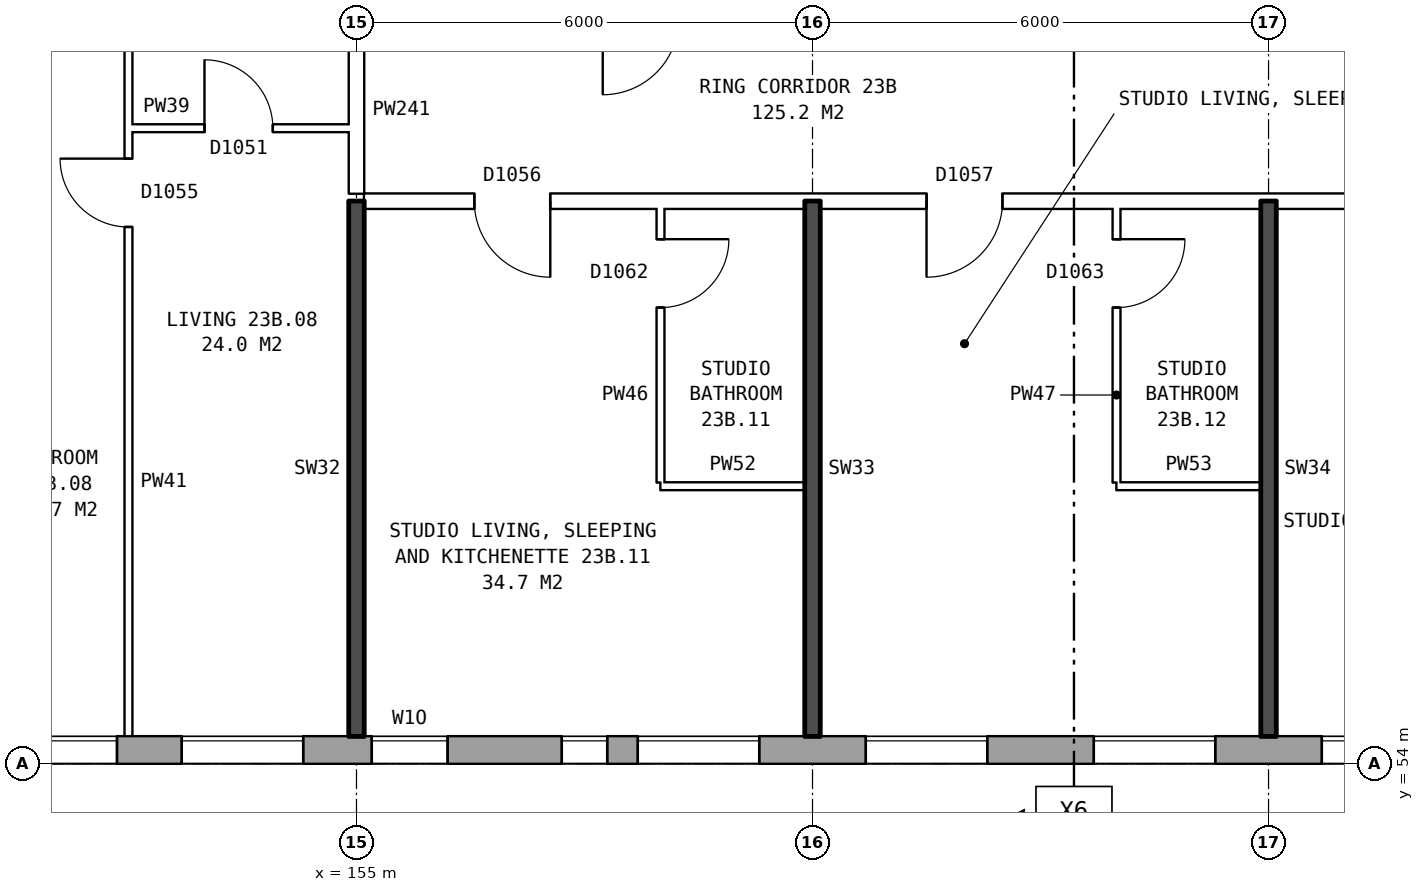
"""IFC4 building model, lengths in metres.
Left out: names, types, materials, properties, quantities, classifications, styles, units other than length and angle.
Written with IfcOpenShell. Run it as: python <this file> out.ifc"""

import sys

from ifc_helpers import new_model, si_unit, direction, frame, frame_2d, origin, place, context, subcontext, project, spatial, rectangle, extrude, element, fill, save


model = new_model("IFC4")
c1 = context("Model", 3, precision=1e-05, world=origin(), true_north=direction((0.0, 1.0)))
c2 = subcontext(c1, "Body", "Model", "MODEL_VIEW")
j1 = project(units=[si_unit("LENGTHUNIT", "METRE"), si_unit("PLANEANGLEUNIT", "RADIAN")], contexts=[c1])
p1 = place(None, origin())
s1 = spatial("IfcSite", under=j1, at=p1, CompositionType="ELEMENT")
p2 = place(p1, origin())
s2 = spatial("IfcBuilding", under=s1, at=p2, CompositionType="ELEMENT")
p3 = place(p2, frame((0.0, 0.0, 84.0)))
s3 = spatial("IfcBuildingStorey", under=s2, at=p3, CompositionType="ELEMENT", Elevation=84.0)
p4 = place(p3, frame((134.075, 54.18, 0.0), z_axis=(0.0, 0.0, 1.0), x_axis=(1.0, 0.0, 0.0)))
e1 = element("IfcWall", 1, at=p4, inside=s3, PredefinedType="STANDARD", context=c2, shape_type="SweptSolid", body=[
    extrude(rectangle(XDim=38.101, YDim=0.36, at=frame_2d((19.05, 0.0))), origin(), (0.0, 0.0, 1.0), 2.85),
])
p5 = place(p4, frame((0.625, 0.0, 0.8)))
e2 = element("IfcOpeningElement", 2, at=p5, cuts=e1, PredefinedType="OPENING", context=c2, shape_type="SweptSolid", body=[
    extrude(rectangle(XDim=1.6, YDim=1.8, at=frame_2d((0.8, 0.9))), frame((0.0, 0.19, 0.0), z_axis=(0.0, -1.0, 0.0), x_axis=(1.0, 0.0, 0.0)), (0.0, 0.0, 1.0), 0.38),
])
p6 = place(p4, frame((3.625, 0.0, 0.8)))
e3 = element("IfcOpeningElement", 3, at=p6, cuts=e1, PredefinedType="OPENING", context=c2, shape_type="SweptSolid", body=[
    extrude(rectangle(XDim=1.6, YDim=1.8, at=frame_2d((0.8, 0.9))), frame((0.0, 0.19, 0.0), z_axis=(0.0, -1.0, 0.0), x_axis=(1.0, 0.0, 0.0)), (0.0, 0.0, 1.0), 0.38),
])
p7 = place(p4, frame((6.625, 0.0, 0.8)))
e4 = element("IfcOpeningElement", 4, at=p7, cuts=e1, PredefinedType="OPENING", context=c2, shape_type="SweptSolid", body=[
    extrude(rectangle(XDim=1.6, YDim=1.8, at=frame_2d((0.8, 0.9))), frame((0.0, 0.19, 0.0), z_axis=(0.0, -1.0, 0.0), x_axis=(1.0, 0.0, 0.0)), (0.0, 0.0, 1.0), 0.38),
])
p8 = place(p4, frame((9.625, 0.0, 0.8)))
e5 = element("IfcOpeningElement", 5, at=p8, cuts=e1, PredefinedType="OPENING", context=c2, shape_type="SweptSolid", body=[
    extrude(rectangle(XDim=1.6, YDim=1.8, at=frame_2d((0.8, 0.9))), frame((0.0, 0.19, 0.0), z_axis=(0.0, -1.0, 0.0), x_axis=(1.0, 0.0, 0.0)), (0.0, 0.0, 1.0), 0.38),
])
p9 = place(p4, frame((12.075, 0.0, 0.8)))
e6 = element("IfcOpeningElement", 6, at=p9, cuts=e1, PredefinedType="OPENING", context=c2, shape_type="SweptSolid", body=[
    extrude(rectangle(XDim=1.4, YDim=1.8, at=frame_2d((0.7, 0.9))), frame((0.0, 0.19, 0.0), z_axis=(0.0, -1.0, 0.0), x_axis=(1.0, 0.0, 0.0)), (0.0, 0.0, 1.0), 0.38),
])
p10 = place(p4, frame((15.475, 0.0, 0.65)))
e7 = element("IfcOpeningElement", 7, at=p10, cuts=e1, PredefinedType="OPENING", context=c2, shape_type="SweptSolid", body=[
    extrude(rectangle(XDim=0.6, YDim=0.9, at=frame_2d((0.3, 0.45))), frame((0.0, 0.19, 0.0), z_axis=(0.0, -1.0, 0.0), x_axis=(1.0, 0.0, 0.0)), (0.0, 0.0, 1.0), 0.38),
])
p11 = place(p4, frame((18.625, 0.0, 0.8)))
e8 = element("IfcOpeningElement", 8, at=p11, cuts=e1, PredefinedType="OPENING", context=c2, shape_type="SweptSolid", body=[
    extrude(rectangle(XDim=1.6, YDim=1.8, at=frame_2d((0.8, 0.9))), frame((0.0, 0.19, 0.0), z_axis=(0.0, -1.0, 0.0), x_axis=(1.0, 0.0, 0.0)), (0.0, 0.0, 1.0), 0.38),
])
p12 = place(p4, frame((21.125, 0.0, 0.8)))
e9 = element("IfcOpeningElement", 9, at=p12, cuts=e1, PredefinedType="OPENING", context=c2, shape_type="SweptSolid", body=[
    extrude(rectangle(XDim=1.0, YDim=1.2, at=frame_2d((0.5, 0.6))), frame((0.0, 0.19, 0.0), z_axis=(0.0, -1.0, 0.0), x_axis=(1.0, 0.0, 0.0)), (0.0, 0.0, 1.0), 0.38),
])
p13 = place(p4, frame((24.625, 0.0, 0.8)))
e10 = element("IfcOpeningElement", 10, at=p13, cuts=e1, PredefinedType="OPENING", context=c2, shape_type="SweptSolid", body=[
    extrude(rectangle(XDim=1.6, YDim=1.8, at=frame_2d((0.8, 0.9))), frame((0.0, 0.19, 0.0), z_axis=(0.0, -1.0, 0.0), x_axis=(1.0, 0.0, 0.0)), (0.0, 0.0, 1.0), 0.38),
])
p14 = place(p4, frame((27.625, 0.0, 0.8)))
e11 = element("IfcOpeningElement", 11, at=p14, cuts=e1, PredefinedType="OPENING", context=c2, shape_type="SweptSolid", body=[
    extrude(rectangle(XDim=1.6, YDim=1.8, at=frame_2d((0.8, 0.9))), frame((0.0, 0.19, 0.0), z_axis=(0.0, -1.0, 0.0), x_axis=(1.0, 0.0, 0.0)), (0.0, 0.0, 1.0), 0.38),
])
p15 = place(p4, frame((30.625, 0.0, 0.8)))
e12 = element("IfcOpeningElement", 12, at=p15, cuts=e1, PredefinedType="OPENING", context=c2, shape_type="SweptSolid", body=[
    extrude(rectangle(XDim=1.6, YDim=1.8, at=frame_2d((0.8, 0.9))), frame((0.0, 0.19, 0.0), z_axis=(0.0, -1.0, 0.0), x_axis=(1.0, 0.0, 0.0)), (0.0, 0.0, 1.0), 0.38),
])
p16 = place(p4, frame((33.625, 0.0, 0.8)))
e13 = element("IfcOpeningElement", 13, at=p16, cuts=e1, PredefinedType="OPENING", context=c2, shape_type="SweptSolid", body=[
    extrude(rectangle(XDim=1.6, YDim=1.8, at=frame_2d((0.8, 0.9))), frame((0.0, 0.19, 0.0), z_axis=(0.0, -1.0, 0.0), x_axis=(1.0, 0.0, 0.0)), (0.0, 0.0, 1.0), 0.38),
])
p17 = place(p4, frame((13.775, 0.0, 1.6)))
e14 = element("IfcOpeningElement", 14, at=p17, cuts=e1, PredefinedType="OPENING", context=c2, shape_type="SweptSolid", body=[
    extrude(rectangle(XDim=0.6, YDim=0.9, at=frame_2d((0.3, 0.45))), frame((0.0, 0.19, 0.0), z_axis=(0.0, -1.0, 0.0), x_axis=(1.0, 0.0, 0.0)), (0.0, 0.0, 1.0), 0.38),
])
p18 = place(p4, frame((16.375, 0.0, 0.65)))
e15 = element("IfcOpeningElement", 15, at=p18, cuts=e1, PredefinedType="OPENING", context=c2, shape_type="SweptSolid", body=[
    extrude(rectangle(XDim=1.4, YDim=1.8, at=frame_2d((0.7, 0.9))), frame((0.0, 0.19, 0.0), z_axis=(0.0, -1.0, 0.0), x_axis=(1.0, 0.0, 0.0)), (0.0, 0.0, 1.0), 0.38),
])
p19 = place(p4, frame((23.625, 0.0, 1.7)))
e16 = element("IfcOpeningElement", 16, at=p19, cuts=e1, PredefinedType="OPENING", context=c2, shape_type="SweptSolid", body=[
    extrude(rectangle(XDim=0.6, YDim=0.9, at=frame_2d((0.3, 0.45))), frame((0.0, 0.19, 0.0), z_axis=(0.0, -1.0, 0.0), x_axis=(1.0, 0.0, 0.0)), (0.0, 0.0, 1.0), 0.38),
])
for number, where, z_axis, x_axis in (
    (17, (159.0, 57.65, 0.0), (0.0, 0.0, 1.0), (1.0, 0.0, 0.0)),
    (18, (165.0, 57.65, 0.0), (0.0, 0.0, 1.0), (1.0, 0.0, 0.0)),
):
    element("IfcWall", number, at=place(p3, frame(where, z_axis=z_axis, x_axis=x_axis)), inside=s3, PredefinedType="PARTITIONING", context=c2, shape_type="SweptSolid", body=[
        extrude(rectangle(XDim=1.9, YDim=0.1, at=frame_2d((0.95, 0.0))), origin(), (0.0, 0.0, 1.0), 2.85),
    ])
p20 = place(p3, frame((155.1, 61.4, 0.0), z_axis=(0.0, 0.0, 1.0), x_axis=(1.0, 0.0, 0.0)))
e19 = element("IfcWall", 19, at=p20, inside=s3, PredefinedType="PARTITIONING", context=c2, shape_type="SweptSolid", body=[
    extrude(rectangle(XDim=19.79, YDim=0.2, at=frame_2d((9.895, 0.0))), origin(), (0.0, 0.0, 1.0), 2.85),
])
p21 = place(p20, frame((1.45, 0.0, 0.0)))
e20 = element("IfcOpeningElement", 20, at=p21, cuts=e19, PredefinedType="OPENING", context=c2, shape_type="SweptSolid", body=[
    extrude(rectangle(XDim=1.0, YDim=2.1, at=frame_2d((0.5, 1.05))), frame((0.0, 0.11, 0.0), z_axis=(0.0, -1.0, 0.0), x_axis=(1.0, 0.0, 0.0)), (0.0, 0.0, 1.0), 0.22),
])
p22 = place(p20, frame((7.4, 0.0, 0.0)))
e21 = element("IfcOpeningElement", 21, at=p22, cuts=e19, PredefinedType="OPENING", context=c2, shape_type="SweptSolid", body=[
    extrude(rectangle(XDim=1.0, YDim=2.1, at=frame_2d((0.5, 1.05))), frame((0.0, 0.11, 0.0), z_axis=(0.0, -1.0, 0.0), x_axis=(1.0, 0.0, 0.0)), (0.0, 0.0, 1.0), 0.22),
])
p23 = place(p20, frame((13.2, 0.0, 0.0)))
e22 = element("IfcOpeningElement", 22, at=p23, cuts=e19, PredefinedType="OPENING", context=c2, shape_type="SweptSolid", body=[
    extrude(rectangle(XDim=1.0, YDim=2.1, at=frame_2d((0.5, 1.05))), frame((0.0, 0.11, 0.0), z_axis=(0.0, -1.0, 0.0), x_axis=(1.0, 0.0, 0.0)), (0.0, 0.0, 1.0), 0.22),
])
p24 = place(p3, frame((152.0, 62.36, 0.0), z_axis=(0.0, 0.0, 1.0), x_axis=(1.0, 0.0, 0.0)))
e23 = element("IfcWall", 23, at=p24, inside=s3, PredefinedType="PARTITIONING", context=c2, shape_type="SweptSolid", body=[
    extrude(rectangle(XDim=2.9, YDim=0.1, at=frame_2d((1.45, 0.0))), origin(), (0.0, 0.0, 1.0), 2.85),
])
p25 = place(p24, frame((1.0, 0.0, 0.0)))
e24 = element("IfcOpeningElement", 24, at=p25, cuts=e23, PredefinedType="OPENING", context=c2, shape_type="SweptSolid", body=[
    extrude(rectangle(XDim=0.9, YDim=2.1, at=frame_2d((0.45, 1.05))), frame((0.0, 0.06, 0.0), z_axis=(0.0, -1.0, 0.0), x_axis=(1.0, 0.0, 0.0)), (0.0, 0.0, 1.0), 0.12),
])
p26 = place(p3, frame((152.0, 54.36, 0.0), z_axis=(0.0, 0.0, 1.0), x_axis=(0.0, 1.0, 0.0)))
e25 = element("IfcWall", 25, at=p26, inside=s3, PredefinedType="PARTITIONING", context=c2, shape_type="SweptSolid", body=[
    extrude(rectangle(XDim=14.34, YDim=0.1, at=frame_2d((7.17, 0.0))), origin(), (0.0, 0.0, 1.0), 2.85),
])
p27 = place(p26, frame((6.7, 0.0, 0.0)))
e26 = element("IfcOpeningElement", 26, at=p27, cuts=e25, PredefinedType="OPENING", context=c2, shape_type="SweptSolid", body=[
    extrude(rectangle(XDim=0.9, YDim=2.1, at=frame_2d((0.45, 1.05))), frame((0.0, 0.06, 0.0), z_axis=(0.0, -1.0, 0.0), x_axis=(1.0, 0.0, 0.0)), (0.0, 0.0, 1.0), 0.12),
])
p28 = place(p26, frame((13.04, 0.0, 0.0)))
e27 = element("IfcOpeningElement", 27, at=p28, cuts=e25, PredefinedType="OPENING", context=c2, shape_type="SweptSolid", body=[
    extrude(rectangle(XDim=0.9, YDim=2.1, at=frame_2d((0.45, 1.05))), frame((0.0, 0.06, 0.0), z_axis=(0.0, -1.0, 0.0), x_axis=(1.0, 0.0, 0.0)), (0.0, 0.0, 1.0), 0.12),
])
p29 = place(p3, frame((155.0, 54.36, 0.0), z_axis=(0.0, 0.0, 1.0), x_axis=(0.0, 1.0, 0.0)))
e28 = element("IfcWall", 28, at=p29, inside=s3, PredefinedType="SOLIDWALL", context=c2, shape_type="SweptSolid", body=[
    extrude(rectangle(XDim=7.04, YDim=0.2, at=frame_2d((3.52, 0.0))), origin(), (0.0, 0.0, 1.0), 2.85),
])
p30 = place(p3, frame((155.0, 61.5, 0.0), z_axis=(0.0, 0.0, 1.0), x_axis=(0.0, 1.0, 0.0)))
e29 = element("IfcWall", 29, at=p30, inside=s3, PredefinedType="PARTITIONING", context=c2, shape_type="SweptSolid", body=[
    extrude(rectangle(XDim=2.2, YDim=0.2, at=frame_2d((1.1, 0.0))), origin(), (0.0, 0.0, 1.0), 2.85),
])
p31 = place(p3, frame((159.0, 57.7, 0.0), z_axis=(0.0, 0.0, 1.0), x_axis=(0.0, 1.0, 0.0)))
e30 = element("IfcWall", 30, at=p31, inside=s3, PredefinedType="PARTITIONING", context=c2, shape_type="SweptSolid", body=[
    extrude(rectangle(XDim=3.6, YDim=0.1, at=frame_2d((1.8, 0.0))), origin(), (0.0, 0.0, 1.0), 2.85),
])
p32 = place(p31, frame((2.3, 0.0, 0.0)))
e31 = element("IfcOpeningElement", 31, at=p32, cuts=e30, PredefinedType="OPENING", context=c2, shape_type="SweptSolid", body=[
    extrude(rectangle(XDim=0.9, YDim=2.1, at=frame_2d((0.45, 1.05))), frame((0.0, 0.06, 0.0), z_axis=(0.0, -1.0, 0.0), x_axis=(1.0, 0.0, 0.0)), (0.0, 0.0, 1.0), 0.12),
])
p33 = place(p3, frame((161.0, 54.36, 0.0), z_axis=(0.0, 0.0, 1.0), x_axis=(0.0, 1.0, 0.0)))
e32 = element("IfcWall", 32, at=p33, inside=s3, PredefinedType="SOLIDWALL", context=c2, shape_type="SweptSolid", body=[
    extrude(rectangle(XDim=7.04, YDim=0.2, at=frame_2d((3.52, 0.0))), origin(), (0.0, 0.0, 1.0), 2.85),
])
p34 = place(p3, frame((165.0, 57.7, 0.0), z_axis=(0.0, 0.0, 1.0), x_axis=(0.0, 1.0, 0.0)))
e33 = element("IfcWall", 33, at=p34, inside=s3, PredefinedType="PARTITIONING", context=c2, shape_type="SweptSolid", body=[
    extrude(rectangle(XDim=3.6, YDim=0.1, at=frame_2d((1.8, 0.0))), origin(), (0.0, 0.0, 1.0), 2.85),
])
p35 = place(p34, frame((2.3, 0.0, 0.0)))
e34 = element("IfcOpeningElement", 34, at=p35, cuts=e33, PredefinedType="OPENING", context=c2, shape_type="SweptSolid", body=[
    extrude(rectangle(XDim=0.9, YDim=2.1, at=frame_2d((0.45, 1.05))), frame((0.0, 0.06, 0.0), z_axis=(0.0, -1.0, 0.0), x_axis=(1.0, 0.0, 0.0)), (0.0, 0.0, 1.0), 0.12),
])
p36 = place(p3, frame((167.0, 54.36, 0.0), z_axis=(0.0, 0.0, 1.0), x_axis=(0.0, 1.0, 0.0)))
e35 = element("IfcWall", 35, at=p36, inside=s3, PredefinedType="SOLIDWALL", context=c2, shape_type="SweptSolid", body=[
    extrude(rectangle(XDim=7.04, YDim=0.2, at=frame_2d((3.52, 0.0))), origin(), (0.0, 0.0, 1.0), 2.85),
])
p37 = place(p11, origin())
e36 = element("IfcWindow", 36, at=p37, inside=s3, PartitioningType="SINGLE_PANEL", PredefinedType="WINDOW", context=c2, shape_type="SweptSolid", body=[
    extrude(rectangle(XDim=1.6, YDim=1.8, at=frame_2d((0.8, 0.9))), frame((0.0, 0.15, 0.0), z_axis=(0.0, -1.0, 0.0), x_axis=(1.0, 0.0, 0.0)), (0.0, 0.0, 1.0), 0.06),
])
fill(e8, e36)
p38 = place(p12, origin())
e37 = element("IfcWindow", 37, at=p38, inside=s3, PartitioningType="SINGLE_PANEL", PredefinedType="WINDOW", context=c2, shape_type="SweptSolid", body=[
    extrude(rectangle(XDim=1.0, YDim=1.2, at=frame_2d((0.5, 0.6))), frame((0.0, 0.15, 0.0), z_axis=(0.0, -1.0, 0.0), x_axis=(1.0, 0.0, 0.0)), (0.0, 0.0, 1.0), 0.06),
])
fill(e9, e37)
p39 = place(p13, origin())
e38 = element("IfcWindow", 38, at=p39, inside=s3, PartitioningType="SINGLE_PANEL", PredefinedType="WINDOW", context=c2, shape_type="SweptSolid", body=[
    extrude(rectangle(XDim=1.6, YDim=1.8, at=frame_2d((0.8, 0.9))), frame((0.0, 0.15, 0.0), z_axis=(0.0, -1.0, 0.0), x_axis=(1.0, 0.0, 0.0)), (0.0, 0.0, 1.0), 0.06),
])
fill(e10, e38)
p40 = place(p14, origin())
e39 = element("IfcWindow", 39, at=p40, inside=s3, PartitioningType="SINGLE_PANEL", PredefinedType="WINDOW", context=c2, shape_type="SweptSolid", body=[
    extrude(rectangle(XDim=1.6, YDim=1.8, at=frame_2d((0.8, 0.9))), frame((0.0, 0.15, 0.0), z_axis=(0.0, -1.0, 0.0), x_axis=(1.0, 0.0, 0.0)), (0.0, 0.0, 1.0), 0.06),
])
fill(e11, e39)
p41 = place(p15, origin())
e40 = element("IfcWindow", 40, at=p41, inside=s3, PartitioningType="SINGLE_PANEL", PredefinedType="WINDOW", context=c2, shape_type="SweptSolid", body=[
    extrude(rectangle(XDim=1.6, YDim=1.8, at=frame_2d((0.8, 0.9))), frame((0.0, 0.15, 0.0), z_axis=(0.0, -1.0, 0.0), x_axis=(1.0, 0.0, 0.0)), (0.0, 0.0, 1.0), 0.06),
])
fill(e12, e40)
p42 = place(p16, origin())
e41 = element("IfcWindow", 41, at=p42, inside=s3, PartitioningType="SINGLE_PANEL", PredefinedType="WINDOW", context=c2, shape_type="SweptSolid", body=[
    extrude(rectangle(XDim=1.6, YDim=1.8, at=frame_2d((0.8, 0.9))), frame((0.0, 0.15, 0.0), z_axis=(0.0, -1.0, 0.0), x_axis=(1.0, 0.0, 0.0)), (0.0, 0.0, 1.0), 0.06),
])
fill(e13, e41)
p43 = place(p27, origin())
e42 = element("IfcDoor", 42, at=p43, inside=s3, OperationType="SINGLE_SWING_RIGHT", PredefinedType="DOOR", context=c2, shape_type="SweptSolid", body=[
    extrude(rectangle(XDim=0.9, YDim=2.1, at=frame_2d((0.45, 1.05))), frame((0.0, 0.025, 0.0), z_axis=(0.0, -1.0, 0.0), x_axis=(1.0, 0.0, 0.0)), (0.0, 0.0, 1.0), 0.05),
])
fill(e26, e42)
p44 = place(p25, origin())
e43 = element("IfcDoor", 43, at=p44, inside=s3, OperationType="SINGLE_SWING_LEFT", PredefinedType="DOOR", context=c2, shape_type="SweptSolid", body=[
    extrude(rectangle(XDim=0.9, YDim=2.1, at=frame_2d((0.45, 1.05))), frame((0.0, 0.025, 0.0), z_axis=(0.0, -1.0, 0.0), x_axis=(1.0, 0.0, 0.0)), (0.0, 0.0, 1.0), 0.05),
])
fill(e24, e43)
p45 = place(p21, frame((1.0, 0.0, 0.0), z_axis=(0.0, 0.0, 1.0), x_axis=(-1.0, 0.0, 0.0)))
e44 = element("IfcDoor", 44, at=p45, inside=s3, OperationType="SINGLE_SWING_LEFT", PredefinedType="DOOR", context=c2, shape_type="SweptSolid", body=[
    extrude(rectangle(XDim=1.0, YDim=2.1, at=frame_2d((0.5, 1.05))), frame((0.0, 0.025, 0.0), z_axis=(0.0, -1.0, 0.0), x_axis=(1.0, 0.0, 0.0)), (0.0, 0.0, 1.0), 0.05),
])
fill(e20, e44)
p46 = place(p32, frame((0.9, 0.0, 0.0), z_axis=(0.0, 0.0, 1.0), x_axis=(-1.0, 0.0, 0.0)))
e45 = element("IfcDoor", 45, at=p46, inside=s3, OperationType="SINGLE_SWING_LEFT", PredefinedType="DOOR", context=c2, shape_type="SweptSolid", body=[
    extrude(rectangle(XDim=0.9, YDim=2.1, at=frame_2d((0.45, 1.05))), frame((0.0, 0.025, 0.0), z_axis=(0.0, -1.0, 0.0), x_axis=(1.0, 0.0, 0.0)), (0.0, 0.0, 1.0), 0.05),
])
fill(e31, e45)
p47 = place(p22, frame((1.0, 0.0, 0.0), z_axis=(0.0, 0.0, 1.0), x_axis=(-1.0, 0.0, 0.0)))
e46 = element("IfcDoor", 46, at=p47, inside=s3, OperationType="SINGLE_SWING_RIGHT", PredefinedType="DOOR", context=c2, shape_type="SweptSolid", body=[
    extrude(rectangle(XDim=1.0, YDim=2.1, at=frame_2d((0.5, 1.05))), frame((0.0, 0.025, 0.0), z_axis=(0.0, -1.0, 0.0), x_axis=(1.0, 0.0, 0.0)), (0.0, 0.0, 1.0), 0.05),
])
fill(e21, e46)
p48 = place(p35, frame((0.9, 0.0, 0.0), z_axis=(0.0, 0.0, 1.0), x_axis=(-1.0, 0.0, 0.0)))
e47 = element("IfcDoor", 47, at=p48, inside=s3, OperationType="SINGLE_SWING_LEFT", PredefinedType="DOOR", context=c2, shape_type="SweptSolid", body=[
    extrude(rectangle(XDim=0.9, YDim=2.1, at=frame_2d((0.45, 1.05))), frame((0.0, 0.025, 0.0), z_axis=(0.0, -1.0, 0.0), x_axis=(1.0, 0.0, 0.0)), (0.0, 0.0, 1.0), 0.05),
])
fill(e34, e47)
p49 = place(p18, origin())
e48 = element("IfcWindow", 48, at=p49, inside=s3, PartitioningType="SINGLE_PANEL", PredefinedType="WINDOW", context=c2, shape_type="SweptSolid", body=[
    extrude(rectangle(XDim=1.4, YDim=1.8, at=frame_2d((0.7, 0.9))), frame((0.0, 0.15, 0.0), z_axis=(0.0, -1.0, 0.0), x_axis=(1.0, 0.0, 0.0)), (0.0, 0.0, 1.0), 0.06),
])
fill(e15, e48)
p50 = place(p19, origin())
e49 = element("IfcWindow", 49, at=p50, inside=s3, PartitioningType="SINGLE_PANEL", PredefinedType="WINDOW", context=c2, shape_type="SweptSolid", body=[
    extrude(rectangle(XDim=0.6, YDim=0.9, at=frame_2d((0.3, 0.45))), frame((0.0, 0.15, 0.0), z_axis=(0.0, -1.0, 0.0), x_axis=(1.0, 0.0, 0.0)), (0.0, 0.0, 1.0), 0.06),
])
fill(e16, e49)
save(model, sys.argv[1])
